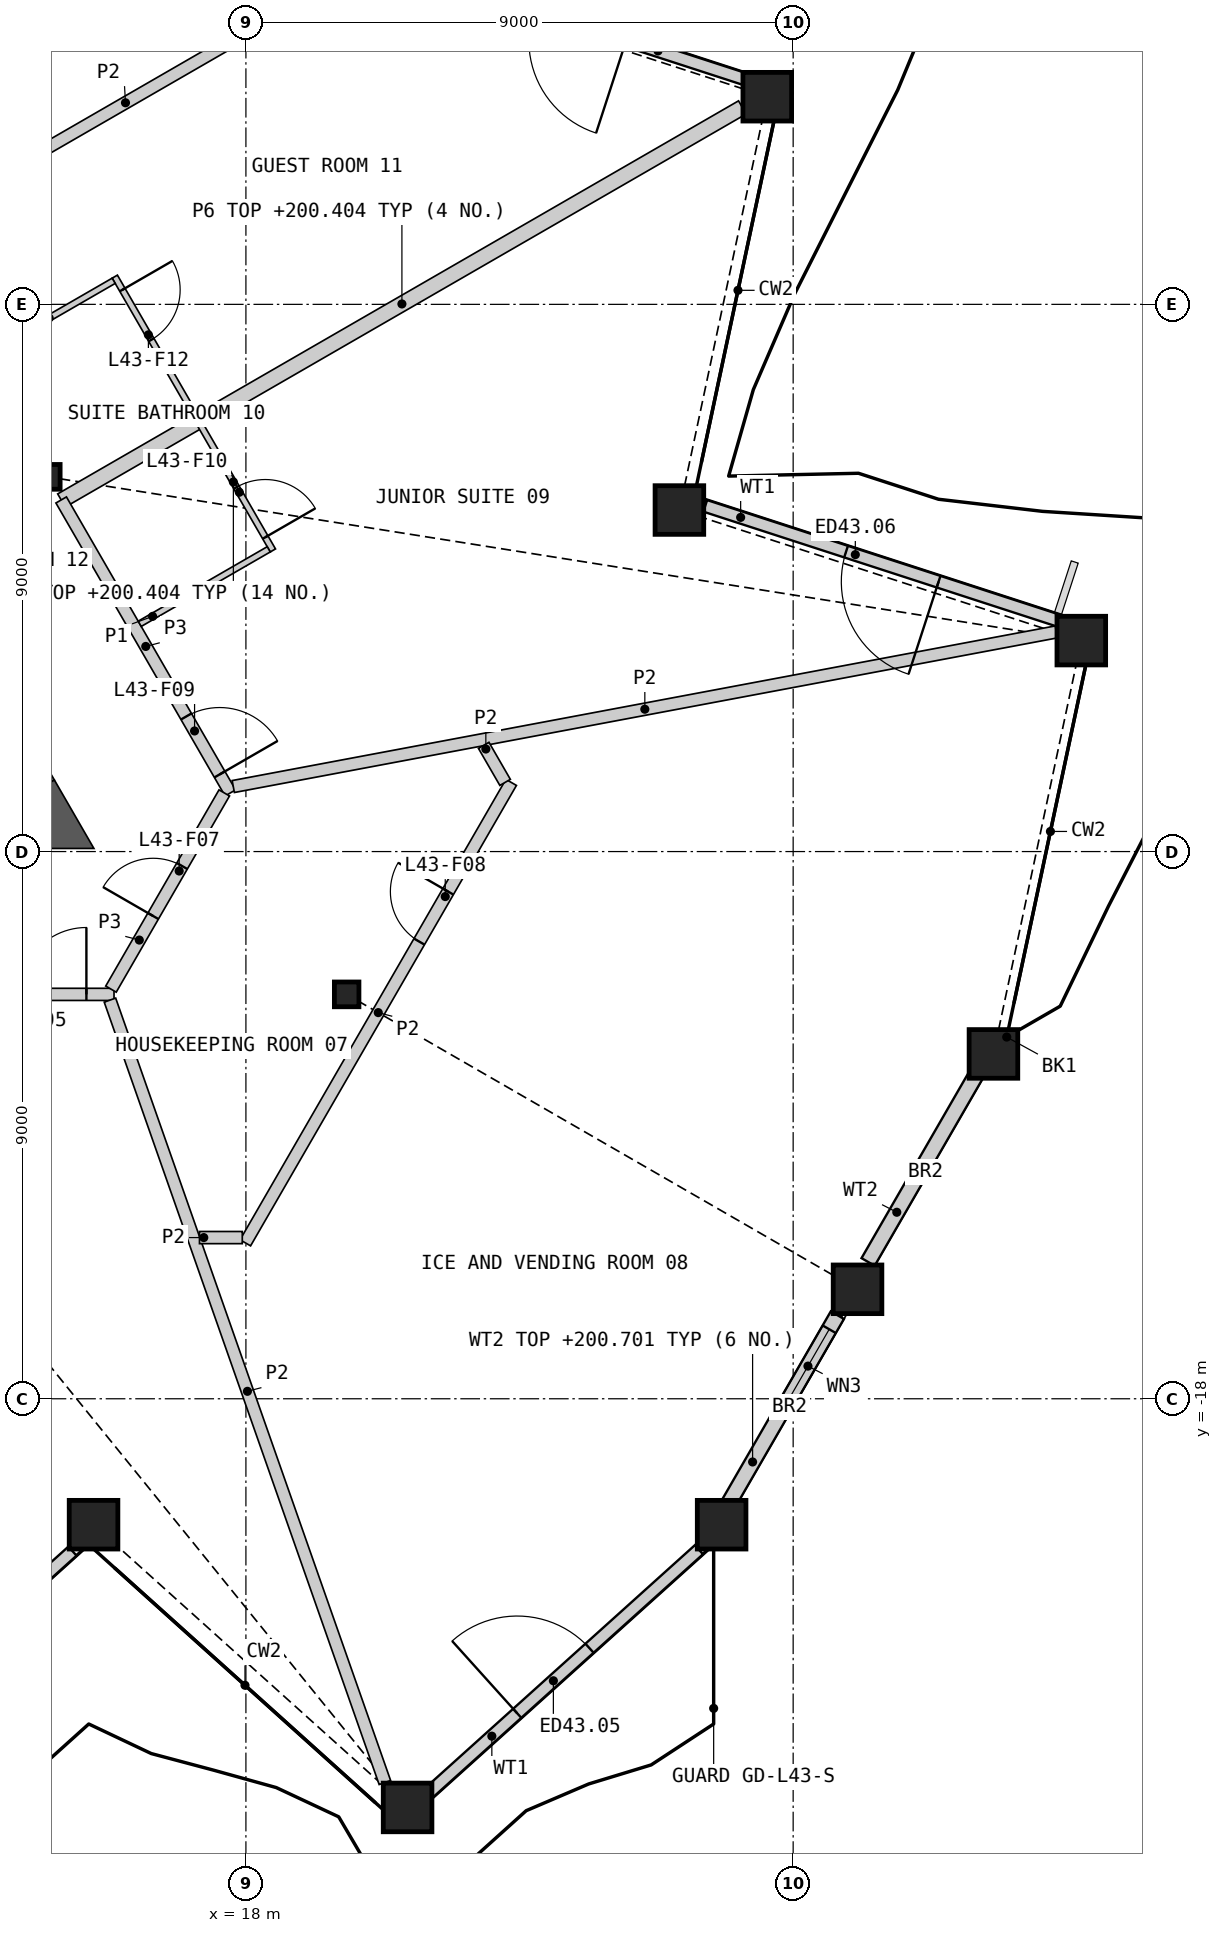
"""IFC4 building model, lengths in metres.
Left out: names, types, materials, properties, quantities, classifications, styles, units other than length and angle.
Written with IfcOpenShell. Run it as: python <this file> out.ifc"""

import sys

from ifc_helpers import new_model, si_unit, direction, frame, frame_2d, origin, origin_2d, place, context, subcontext, project, spatial, polyline, rectangle, hollow_rectangle, i_section, outline, extrude, element, fill, save


model = new_model("IFC4")
c1 = context("Model", 3, precision=1e-05, world=origin(), true_north=direction((0.0, 1.0)))
c2 = subcontext(c1, "Body", "Model", "MODEL_VIEW")
j1 = project(units=[si_unit("LENGTHUNIT", "METRE"), si_unit("PLANEANGLEUNIT", "RADIAN")], contexts=[c1])
p1 = place(None, origin())
s1 = spatial("IfcSite", under=j1, at=p1, CompositionType="ELEMENT")
p2 = place(p1, origin())
s2 = spatial("IfcBuilding", under=s1, at=p2, CompositionType="ELEMENT")
p3 = place(p2, frame((0.0, 0.0, 198.0)))
s3 = spatial("IfcBuildingStorey", under=s2, at=p3, CompositionType="ELEMENT", Elevation=198.0)
for number, where, z_axis, x_axis in (
    (1, (15.494, -20.071, 0.0), (0.0, 0.0, 1.0), (1.0, 0.0, 0.0)),
    (2, (20.659, -24.722, 0.0), (0.0, 0.0, 1.0), (1.0, 0.0, 0.0)),
    (3, (25.823, -20.071, 0.0), (0.0, 0.0, 1.0), (1.0, 0.0, 0.0)),
    (4, (28.059, -16.2, 0.0), (0.0, 0.0, 1.0), (1.0, 0.0, 0.0)),
    (5, (30.294, -12.328, 0.0), (0.0, 0.0, 1.0), (1.0, 0.0, 0.0)),
    (6, (31.739, -5.53, 0.0), (0.0, 0.0, 1.0), (1.0, 0.0, 0.0)),
    (7, (25.129, -3.383, 0.0), (0.0, 0.0, 1.0), (1.0, 0.0, 0.0)),
    (8, (26.574, 3.415, 0.0), (0.0, 0.0, 1.0), (1.0, 0.0, 0.0)),
):
    element("IfcColumn", number, at=place(p3, frame(where, z_axis=z_axis, x_axis=x_axis)), inside=s3, PredefinedType="COLUMN", context=c2, shape_type="SweptSolid", body=[
        extrude(hollow_rectangle(XDim=0.8, YDim=0.8, WallThickness=0.05, at=origin_2d()), origin(), (0.0, 0.0, 1.0), 3.6),
    ])
for number, where, z_axis, x_axis in (
    (9, (19.657, -11.349, 0.0), (0.0, 0.0, 1.0), (1.0, 0.0, 0.0)),
    (10, (14.743, -2.837, 0.0), (0.0, 0.0, 1.0), (1.0, 0.0, 0.0)),
):
    element("IfcColumn", number, at=place(p3, frame(where, z_axis=z_axis, x_axis=x_axis)), inside=s3, PredefinedType="COLUMN", context=c2, shape_type="SweptSolid", body=[
        extrude(i_section(OverallWidth=0.404, OverallDepth=0.407, WebThickness=0.027, FlangeThickness=0.044, at=origin_2d()), origin(), (0.0, 0.0, 1.0), 3.6),
    ])
p4 = place(p3, frame((10.632, -24.571, 0.0), z_axis=(0.0, 0.0, 1.0), x_axis=(0.743144281997, 0.669131209954, 0.0)))
e11 = element("IfcWall", 11, at=p4, inside=s3, PredefinedType="SOLIDWALL", context=c2, shape_type="SweptSolid", body=[
    extrude(rectangle(XDim=6.076, YDim=0.2, at=frame_2d((3.038, 0.0))), origin(), (0.0, 0.0, 1.0), 2.701),
])
p5 = place(p4, frame((2.089, 0.0, 0.0)))
e12 = element("IfcOpeningElement", 12, at=p5, cuts=e11, PredefinedType="OPENING", context=c2, shape_type="SweptSolid", body=[
    extrude(rectangle(XDim=1.6, YDim=2.4, at=frame_2d((0.8, 1.2))), frame((0.0, 0.11, 0.0), z_axis=(0.0, -1.0, 0.0), x_axis=(1.0, 0.0, 0.0)), (0.0, 0.0, 1.0), 0.22),
])
p6 = place(p3, frame((20.909, -24.571, 0.0), z_axis=(0.0, 0.0, 1.0), x_axis=(0.743153082589, 0.669121435794, 0.0)))
e13 = element("IfcWall", 13, at=p6, inside=s3, PredefinedType="SOLIDWALL", context=c2, shape_type="SweptSolid", body=[
    extrude(rectangle(XDim=6.111, YDim=0.2, at=frame_2d((3.055, 0.0))), origin(), (0.0, 0.0, 1.0), 2.701),
])
p7 = place(p6, frame((2.089, 0.0, 0.0)))
e14 = element("IfcOpeningElement", 14, at=p7, cuts=e13, PredefinedType="OPENING", context=c2, shape_type="SweptSolid", body=[
    extrude(rectangle(XDim=1.6, YDim=2.4, at=frame_2d((0.8, 1.2))), frame((0.0, 0.11, 0.0), z_axis=(0.0, -1.0, 0.0), x_axis=(1.0, 0.0, 0.0)), (0.0, 0.0, 1.0), 0.22),
])
p8 = place(p3, frame((25.868, -19.844, 0.0), z_axis=(0.0, 0.0, 1.0), x_axis=(0.499995303914, 0.866028115054, 0.0)))
e15 = element("IfcWall", 15, at=p8, inside=s3, PredefinedType="SOLIDWALL", context=c2, shape_type="SweptSolid", body=[
    extrude(rectangle(XDim=3.718, YDim=0.25, at=frame_2d((1.859, 0.0))), origin(), (0.0, 0.0, 1.0), 2.701),
])
p9 = place(p8, frame((2.05, 0.0, 1.7)))
e16 = element("IfcOpeningElement", 16, at=p9, cuts=e15, PredefinedType="OPENING", context=c2, shape_type="SweptSolid", body=[
    extrude(rectangle(XDim=1.4, YDim=0.8, at=frame_2d((0.7, 0.4))), frame((0.0, 0.135, 0.0), z_axis=(0.0, -1.0, 0.0), x_axis=(1.0, 0.0, 0.0)), (0.0, 0.0, 1.0), 0.27),
])
p10 = place(p3, frame((28.232, -15.75, 0.0), z_axis=(0.0, 0.0, 1.0), x_axis=(0.500034075199, 0.866005729565, 0.0)))
e17 = element("IfcWall", 17, at=p10, inside=s3, PredefinedType="SOLIDWALL", context=c2, shape_type="SweptSolid", body=[
    extrude(rectangle(XDim=3.775, YDim=0.25, at=frame_2d((1.888, 0.0))), origin(), (0.0, 0.0, 1.0), 2.701),
])
p11 = place(p3, frame((31.379, -5.207, 0.0), z_axis=(0.0, 0.0, 1.0), x_axis=(-0.951059550827, 0.30900765489, 0.0)))
e18 = element("IfcWall", 18, at=p11, inside=s3, PredefinedType="SOLIDWALL", context=c2, shape_type="SweptSolid", body=[
    extrude(rectangle(XDim=6.125, YDim=0.2, at=frame_2d((3.062, 0.0))), origin(), (0.0, 0.0, 1.0), 2.701),
])
p12 = place(p11, frame((2.089, 0.0, 0.0)))
e19 = element("IfcOpeningElement", 19, at=p12, cuts=e18, PredefinedType="OPENING", context=c2, shape_type="SweptSolid", body=[
    extrude(rectangle(XDim=1.6, YDim=2.4, at=frame_2d((0.8, 1.2))), frame((0.0, 0.11, 0.0), z_axis=(0.0, -1.0, 0.0), x_axis=(1.0, 0.0, 0.0)), (0.0, 0.0, 1.0), 0.22),
])
p13 = place(p3, frame((26.24, 3.693, 0.0), z_axis=(0.0, 0.0, 1.0), x_axis=(-0.951053023356, 0.30902774433, 0.0)))
e20 = element("IfcWall", 20, at=p13, inside=s3, PredefinedType="SOLIDWALL", context=c2, shape_type="SweptSolid", body=[
    extrude(rectangle(XDim=6.152, YDim=0.2, at=frame_2d((3.076, 0.0))), origin(), (0.0, 0.0, 1.0), 2.701),
])
p14 = place(p13, frame((2.089, 0.0, 0.0)))
e21 = element("IfcOpeningElement", 21, at=p14, cuts=e20, PredefinedType="OPENING", context=c2, shape_type="SweptSolid", body=[
    extrude(rectangle(XDim=1.6, YDim=2.4, at=frame_2d((0.8, 1.2))), frame((0.0, 0.11, 0.0), z_axis=(0.0, -1.0, 0.0), x_axis=(1.0, 0.0, 0.0)), (0.0, 0.0, 1.0), 0.22),
])
p15 = place(p3, frame((14.526, -8.011, 0.0), z_axis=(0.0, 0.0, 1.0), x_axis=(-0.499982018922, 0.866035784916, 0.0)))
e22 = element("IfcWall", 22, at=p15, inside=s3, PredefinedType="SHEAR", context=c2, shape_type="SweptSolid", body=[
    extrude(rectangle(XDim=6.785, YDim=0.75, at=frame_2d((3.393, 0.0))), origin(), (0.0, 0.0, 1.0), 3.25),
])
p16 = place(p3, origin())
e23 = element("IfcWall", 23, at=p16, inside=s3, PredefinedType="SHEAR", context=c2, shape_type="SweptSolid", body=[
    extrude(outline(polyline([(14.201, -8.949), (14.201, -8.199), (14.851, -7.824), (15.5, -8.949), (14.201, -8.949)])), origin(), (0.0, 0.0, 1.0), 3.25),
])
p17 = place(p3, frame((14.967, -3.226, 0.0), z_axis=(0.0, 0.0, 1.0), x_axis=(0.866030250269, 0.499991605548, 0.0)))
e24 = element("IfcWall", 24, at=p17, inside=s3, PredefinedType="PARTITIONING", context=c2, shape_type="SweptSolid", body=[
    extrude(rectangle(XDim=12.929, YDim=0.25, at=frame_2d((6.465, 0.0))), origin(), (0.0, 0.0, 1.0), 2.404),
])
p18 = place(p3, frame((10.042, -11.349, 0.0), z_axis=(0.0, 0.0, 1.0), x_axis=(1.0, 0.0, 0.0)))
e25 = element("IfcWall", 25, at=p18, inside=s3, PredefinedType="PARTITIONING", context=c2, shape_type="SweptSolid", body=[
    extrude(rectangle(XDim=5.789, YDim=0.2, at=frame_2d((2.894, 0.0))), origin(), (0.0, 0.0, 1.0), 3.25),
])
p19 = place(p18, frame((4.234, 0.0, 0.0)))
e26 = element("IfcOpeningElement", 26, at=p19, cuts=e25, PredefinedType="OPENING", context=c2, shape_type="SweptSolid", body=[
    extrude(rectangle(XDim=1.1, YDim=2.1, at=frame_2d((0.55, 1.05))), frame((0.0, 0.11, 0.0), z_axis=(0.0, -1.0, 0.0), x_axis=(1.0, 0.0, 0.0)), (0.0, 0.0, 1.0), 0.22),
])
p20 = place(p3, frame((14.962, -3.217, 0.0), z_axis=(0.0, 0.0, 1.0), x_axis=(0.500013660489, -0.866017516754, 0.0)))
e27 = element("IfcWall", 27, at=p20, inside=s3, PredefinedType="PARTITIONING", context=c2, shape_type="SweptSolid", body=[
    extrude(rectangle(XDim=5.564, YDim=0.2, at=frame_2d((2.782, 0.0))), origin(), (0.0, 0.0, 1.0), 3.25),
])
p21 = place(p20, frame((4.112, 0.0, 0.0)))
e28 = element("IfcOpeningElement", 28, at=p21, cuts=e27, PredefinedType="OPENING", context=c2, shape_type="SweptSolid", body=[
    extrude(rectangle(XDim=1.1, YDim=2.1, at=frame_2d((0.55, 1.05))), frame((0.0, 0.11, 0.0), z_axis=(0.0, -1.0, 0.0), x_axis=(1.0, 0.0, 0.0)), (0.0, 0.0, 1.0), 0.22),
])
p22 = place(p3, frame((15.781, -11.262, 0.0), z_axis=(0.0, 0.0, 1.0), x_axis=(0.499958791762, 0.866049194065, 0.0)))
e29 = element("IfcWall", 29, at=p22, inside=s3, PredefinedType="PARTITIONING", context=c2, shape_type="SweptSolid", body=[
    extrude(rectangle(XDim=3.726, YDim=0.2, at=frame_2d((1.863, 0.0))), origin(), (0.0, 0.0, 1.0), 3.25),
])
p23 = place(p22, frame((1.388, 0.0, 0.0)))
e30 = element("IfcOpeningElement", 30, at=p23, cuts=e29, PredefinedType="OPENING", context=c2, shape_type="SweptSolid", body=[
    extrude(rectangle(XDim=0.95, YDim=2.1, at=frame_2d((0.475, 1.05))), frame((0.0, 0.11, 0.0), z_axis=(0.0, -1.0, 0.0), x_axis=(1.0, 0.0, 0.0)), (0.0, 0.0, 1.0), 0.22),
])
p24 = place(p3, frame((17.792, -7.93, 0.0), z_axis=(0.0, 0.0, 1.0), x_axis=(0.982805703999, 0.184642758284, 0.0)))
e31 = element("IfcWall", 31, at=p24, inside=s3, PredefinedType="PARTITIONING", context=c2, shape_type="SweptSolid", body=[
    extrude(rectangle(XDim=13.774, YDim=0.2, at=frame_2d((6.887, 0.0))), origin(), (0.0, 0.0, 1.0), 2.404),
])
p25 = place(p3, frame((15.764, -11.443, 0.0), z_axis=(0.0, 0.0, 1.0), x_axis=(0.331517429591, -0.943449094481, 0.0)))
e32 = element("IfcWall", 32, at=p25, inside=s3, PredefinedType="PARTITIONING", context=c2, shape_type="SweptSolid", body=[
    extrude(rectangle(XDim=13.639, YDim=0.2, at=frame_2d((6.82, 0.0))), origin(), (0.0, 0.0, 1.0), 2.404),
])
p26 = place(p3, frame((17.99, -15.436, 0.0), z_axis=(0.0, 0.0, 1.0), x_axis=(0.500012451049, 0.866018215049, 0.0)))
e33 = element("IfcWall", 33, at=p26, inside=s3, PredefinedType="PARTITIONING", context=c2, shape_type="SweptSolid", body=[
    extrude(rectangle(XDim=8.745, YDim=0.2, at=frame_2d((4.373, 0.0))), origin(), (0.0, 0.0, 1.0), 2.404),
])
p27 = place(p26, frame((5.721, 0.0, 0.0)))
e34 = element("IfcOpeningElement", 34, at=p27, cuts=e33, PredefinedType="OPENING", context=c2, shape_type="SweptSolid", body=[
    extrude(rectangle(XDim=0.95, YDim=2.1, at=frame_2d((0.475, 1.05))), frame((0.0, 0.11, 0.0), z_axis=(0.0, -1.0, 0.0), x_axis=(1.0, 0.0, 0.0)), (0.0, 0.0, 1.0), 0.22),
])
p28 = place(p3, frame((12.484, 1.274, 0.0), z_axis=(0.0, 0.0, 1.0), x_axis=(0.866026229868, 0.499998569178, 0.0)))
e35 = element("IfcWall", 35, at=p28, inside=s3, PredefinedType="PARTITIONING", context=c2, shape_type="SweptSolid", body=[
    extrude(rectangle(XDim=8.164, YDim=0.2, at=frame_2d((4.082, 0.0))), origin(), (0.0, 0.0, 1.0), 2.404),
])
for number, where, z_axis, x_axis in (
    (36, (17.236, -15.349, 0.0), (0.0, 0.0, 1.0), (1.0, 0.0, 0.0)),
    (37, (21.911, -7.253, 0.0), (0.0, 0.0, 1.0), (0.5, -0.866, 0.0)),
):
    element("IfcWall", number, at=place(p3, frame(where, z_axis=z_axis, x_axis=x_axis)), inside=s3, PredefinedType="PARTITIONING", context=c2, shape_type="SweptSolid", body=[
        extrude(rectangle(XDim=0.704, YDim=0.2, at=frame_2d((0.352, 0.0))), origin(), (0.0, 0.0, 1.0), 2.404),
    ])
p29 = place(p3, frame((15.844, 0.456, 0.0), z_axis=(0.0, 0.0, 1.0), x_axis=(0.500006934395, -0.866021400173, 0.0)))
e38 = element("IfcWall", 38, at=p29, inside=s3, PredefinedType="PARTITIONING", context=c2, shape_type="SweptSolid", body=[
    extrude(rectangle(XDim=5.2, YDim=0.1, at=frame_2d((2.6, 0.0))), origin(), (0.0, 0.0, 1.0), 2.404),
])
p30 = place(p29, frame((4.0, 0.0, 0.0)))
e39 = element("IfcOpeningElement", 39, at=p30, cuts=e38, PredefinedType="OPENING", context=c2, shape_type="SweptSolid", body=[
    extrude(rectangle(XDim=0.95, YDim=2.1, at=frame_2d((0.475, 1.05))), frame((0.0, 0.06, 0.0), z_axis=(0.0, -1.0, 0.0), x_axis=(1.0, 0.0, 0.0)), (0.0, 0.0, 1.0), 0.12),
])
p31 = place(p29, frame((0.25, 0.0, 0.0)))
e40 = element("IfcOpeningElement", 40, at=p31, cuts=e38, PredefinedType="OPENING", context=c2, shape_type="SweptSolid", body=[
    extrude(rectangle(XDim=0.95, YDim=2.1, at=frame_2d((0.475, 1.05))), frame((0.0, 0.06, 0.0), z_axis=(0.0, -1.0, 0.0), x_axis=(1.0, 0.0, 0.0)), (0.0, 0.0, 1.0), 0.12),
])
p32 = place(p3, frame((13.704, -0.837, 0.0), z_axis=(0.0, 0.0, 1.0), x_axis=(0.865989751695, 0.500061746146, 0.0)))
e41 = element("IfcWall", 41, at=p32, inside=s3, PredefinedType="PARTITIONING", context=c2, shape_type="SweptSolid", body=[
    extrude(rectangle(XDim=2.45, YDim=0.1, at=frame_2d((1.225, 0.0))), origin(), (0.0, 0.0, 1.0), 2.404),
])
p33 = place(p3, frame((16.254, -5.254, 0.0), z_axis=(0.0, 0.0, 1.0), x_axis=(0.866032905446, 0.499987006516, 0.0)))
e42 = element("IfcWall", 42, at=p33, inside=s3, PredefinedType="PARTITIONING", context=c2, shape_type="SweptSolid", body=[
    extrude(rectangle(XDim=2.45, YDim=0.1, at=frame_2d((1.225, 0.0))), origin(), (0.0, 0.0, 1.0), 2.404),
])
p34 = place(p7, origin())
e43 = element("IfcDoor", 43, at=p34, inside=s3, OperationType="DOUBLE_DOOR_SINGLE_SWING", PredefinedType="DOOR", context=c2, shape_type="SweptSolid", body=[
    extrude(rectangle(XDim=1.6, YDim=2.4, at=frame_2d((0.8, 1.2))), frame((0.0, 0.025, 0.0), z_axis=(0.0, -1.0, 0.0), x_axis=(1.0, 0.0, 0.0)), (0.0, 0.0, 1.0), 0.05),
])
fill(e14, e43)
p35 = place(p9, origin())
e44 = element("IfcWindow", 44, at=p35, inside=s3, PartitioningType="SINGLE_PANEL", PredefinedType="WINDOW", context=c2, shape_type="SweptSolid", body=[
    extrude(rectangle(XDim=1.4, YDim=0.8, at=frame_2d((0.7, 0.4))), frame((0.0, 0.03, 0.0), z_axis=(0.0, -1.0, 0.0), x_axis=(1.0, 0.0, 0.0)), (0.0, 0.0, 1.0), 0.06),
])
fill(e16, e44)
p36 = place(p12, origin())
e45 = element("IfcDoor", 45, at=p36, inside=s3, OperationType="DOUBLE_DOOR_SINGLE_SWING", PredefinedType="DOOR", context=c2, shape_type="SweptSolid", body=[
    extrude(rectangle(XDim=1.6, YDim=2.4, at=frame_2d((0.8, 1.2))), frame((0.0, 0.025, 0.0), z_axis=(0.0, -1.0, 0.0), x_axis=(1.0, 0.0, 0.0)), (0.0, 0.0, 1.0), 0.05),
])
fill(e19, e45)
p37 = place(p19, origin())
e46 = element("IfcDoor", 46, at=p37, inside=s3, OperationType="SINGLE_SWING_RIGHT", PredefinedType="DOOR", context=c2, shape_type="SweptSolid", body=[
    extrude(rectangle(XDim=1.1, YDim=2.1, at=frame_2d((0.55, 1.05))), frame((0.0, 0.025, 0.0), z_axis=(0.0, -1.0, 0.0), x_axis=(1.0, 0.0, 0.0)), (0.0, 0.0, 1.0), 0.05),
])
fill(e26, e46)
p38 = place(p23, origin())
e47 = element("IfcDoor", 47, at=p38, inside=s3, OperationType="SINGLE_SWING_LEFT", PredefinedType="DOOR", context=c2, shape_type="SweptSolid", body=[
    extrude(rectangle(XDim=0.95, YDim=2.1, at=frame_2d((0.475, 1.05))), frame((0.0, 0.025, 0.0), z_axis=(0.0, -1.0, 0.0), x_axis=(1.0, 0.0, 0.0)), (0.0, 0.0, 1.0), 0.05),
])
fill(e30, e47)
p39 = place(p27, origin())
e48 = element("IfcDoor", 48, at=p39, inside=s3, OperationType="SINGLE_SWING_RIGHT", PredefinedType="DOOR", context=c2, shape_type="SweptSolid", body=[
    extrude(rectangle(XDim=0.95, YDim=2.1, at=frame_2d((0.475, 1.05))), frame((0.0, 0.025, 0.0), z_axis=(0.0, -1.0, 0.0), x_axis=(1.0, 0.0, 0.0)), (0.0, 0.0, 1.0), 0.05),
])
fill(e34, e48)
p40 = place(p21, origin())
e49 = element("IfcDoor", 49, at=p40, inside=s3, OperationType="SINGLE_SWING_RIGHT", PredefinedType="DOOR", context=c2, shape_type="SweptSolid", body=[
    extrude(rectangle(XDim=1.1, YDim=2.1, at=frame_2d((0.55, 1.05))), frame((0.0, 0.025, 0.0), z_axis=(0.0, -1.0, 0.0), x_axis=(1.0, 0.0, 0.0)), (0.0, 0.0, 1.0), 0.05),
])
fill(e28, e49)
p41 = place(p30, origin())
e50 = element("IfcDoor", 50, at=p41, inside=s3, OperationType="SINGLE_SWING_RIGHT", PredefinedType="DOOR", context=c2, shape_type="SweptSolid", body=[
    extrude(rectangle(XDim=0.95, YDim=2.1, at=frame_2d((0.475, 1.05))), frame((0.0, 0.025, 0.0), z_axis=(0.0, -1.0, 0.0), x_axis=(1.0, 0.0, 0.0)), (0.0, 0.0, 1.0), 0.05),
])
fill(e39, e50)
p42 = place(p31, origin())
e51 = element("IfcDoor", 51, at=p42, inside=s3, OperationType="SINGLE_SWING_LEFT", PredefinedType="DOOR", context=c2, shape_type="SweptSolid", body=[
    extrude(rectangle(XDim=0.95, YDim=2.1, at=frame_2d((0.475, 1.05))), frame((0.0, 0.025, 0.0), z_axis=(0.0, -1.0, 0.0), x_axis=(1.0, 0.0, 0.0)), (0.0, 0.0, 1.0), 0.05),
])
fill(e40, e51)
save(model, sys.argv[1])
